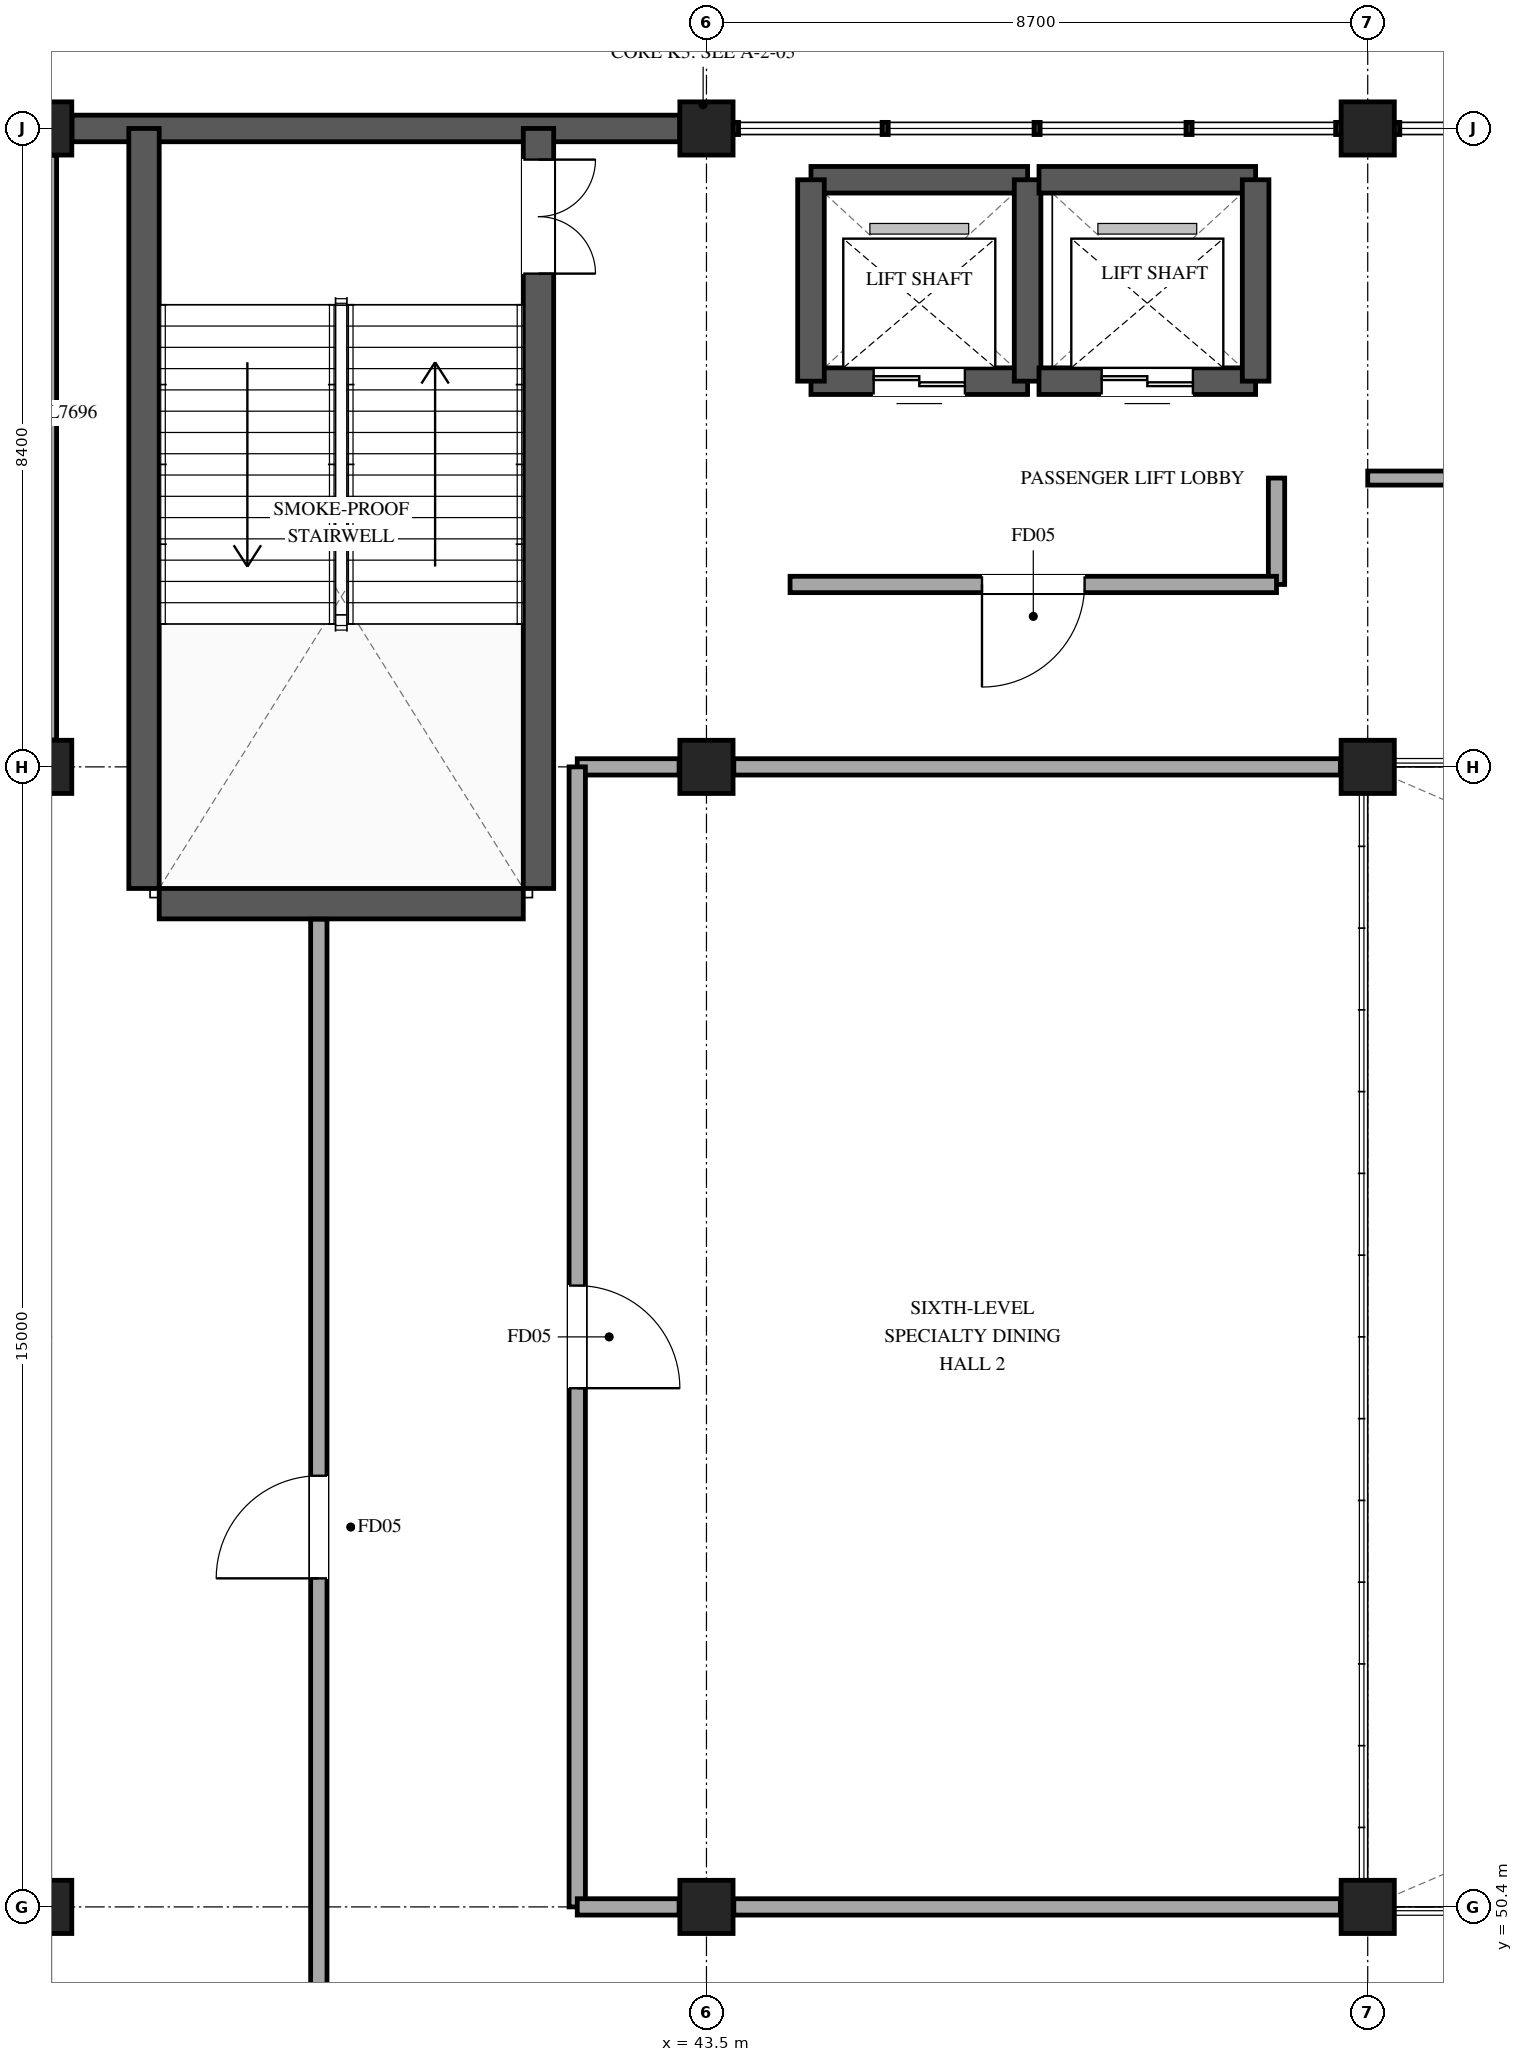
"""IFC4 building model, lengths in metres.
Left out: names, types, materials, properties, quantities, classifications, styles, units other than length and angle.
Written with IfcOpenShell. Run it as: python <this file> out.ifc"""

import sys

from ifc_helpers import new_model, si_unit, direction, frame, frame_2d, origin, origin_2d, place, context, subcontext, project, spatial, rectangle, extrude, element, fill, save


model = new_model("IFC4")
c1 = context("Model", 3, precision=1e-05, world=origin(), true_north=direction((0.0, 1.0)))
c2 = subcontext(c1, "Body", "Model", "MODEL_VIEW")
j1 = project(units=[si_unit("LENGTHUNIT", "METRE"), si_unit("PLANEANGLEUNIT", "RADIAN")], contexts=[c1])
p1 = place(None, origin())
s1 = spatial("IfcSite", under=j1, at=p1, CompositionType="ELEMENT")
p2 = place(p1, origin())
s2 = spatial("IfcBuilding", under=s1, at=p2, CompositionType="ELEMENT")
p3 = place(p2, frame((0.0, 0.0, 26.7)))
s3 = spatial("IfcBuildingStorey", under=s2, at=p3, CompositionType="ELEMENT", Elevation=26.7)
for number, where, z_axis, x_axis in (
    (1, (34.8, 50.4, 0.0), (0.0, 0.0, 1.0), (1.0, 0.0, 0.0)),
    (2, (34.8, 65.4, 0.0), (0.0, 0.0, 1.0), (1.0, 0.0, 0.0)),
    (3, (34.8, 73.8, 0.0), (0.0, 0.0, 1.0), (1.0, 0.0, 0.0)),
    (4, (43.5, 50.4, 0.0), (0.0, 0.0, 1.0), (1.0, 0.0, 0.0)),
    (5, (43.5, 65.4, 0.0), (0.0, 0.0, 1.0), (1.0, 0.0, 0.0)),
    (6, (43.5, 73.8, 0.0), (0.0, 0.0, 1.0), (1.0, 0.0, 0.0)),
    (7, (52.2, 50.4, 0.0), (0.0, 0.0, 1.0), (1.0, 0.0, 0.0)),
    (8, (52.2, 65.4, 0.0), (0.0, 0.0, 1.0), (1.0, 0.0, 0.0)),
    (9, (52.2, 73.8, 0.0), (0.0, 0.0, 1.0), (1.0, 0.0, 0.0)),
):
    element("IfcColumn", number, at=place(p3, frame(where, z_axis=z_axis, x_axis=x_axis)), inside=s3, PredefinedType="COLUMN", context=c2, shape_type="SweptSolid", body=[
        extrude(rectangle(XDim=0.7, YDim=0.7, at=origin_2d()), origin(), (0.0, 0.0, 1.0), 4.8),
    ])
p4 = place(p3, frame((34.8, 65.752, 0.0), z_axis=(0.0, 0.0, 1.0), x_axis=(0.0, 1.0, 0.0)))
e10 = element("IfcWall", 10, at=p4, inside=s3, PredefinedType="STANDARD", context=c2, shape_type="SweptSolid", body=[
    extrude(rectangle(XDim=7.696, YDim=0.3, at=frame_2d((3.848, 0.0))), origin(), (0.0, 0.0, 1.0), 3.955),
])
p5 = place(p3, frame((35.152, 73.8, 0.0), z_axis=(0.0, 0.0, 1.0), x_axis=(1.0, 0.0, 0.0)))
e11 = element("IfcWall", 11, at=p5, inside=s3, PredefinedType="STANDARD", context=c2, shape_type="SweptSolid", body=[
    extrude(rectangle(XDim=7.996, YDim=0.35, at=frame_2d((3.998, 0.0))), origin(), (0.0, 0.0, 1.0), 4.49),
])
p6 = place(p3, frame((36.1, 63.8, 0.0), z_axis=(0.0, 0.0, 1.0), x_axis=(0.0, 1.0, 0.0)))
e12 = element("IfcWall", 12, at=p6, inside=s3, PredefinedType="SHEAR", context=c2, shape_type="SweptSolid", body=[
    extrude(rectangle(XDim=10.0, YDim=0.4, at=frame_2d((5.0, 0.0))), origin(), (0.0, 0.0, 1.0), 4.8),
])
p7 = place(p3, frame((41.29, 73.8, 0.0), z_axis=(0.0, 0.0, 1.0), x_axis=(0.0, -1.0, 0.0)))
e13 = element("IfcWall", 13, at=p7, inside=s3, PredefinedType="SHEAR", context=c2, shape_type="SweptSolid", body=[
    extrude(rectangle(XDim=10.0, YDim=0.4, at=frame_2d((5.0, 0.0))), origin(), (0.0, 0.0, 1.0), 4.8),
])
p8 = place(p7, frame((0.41, 0.0, 0.0)))
e14 = element("IfcOpeningElement", 14, at=p8, cuts=e13, PredefinedType="OPENING", context=c2, shape_type="SweptSolid", body=[
    extrude(rectangle(XDim=1.5, YDim=2.2, at=frame_2d((0.75, 1.1))), frame((0.0, 0.21, 0.0), z_axis=(0.0, -1.0, 0.0), x_axis=(1.0, 0.0, 0.0)), (0.0, 0.0, 1.0), 0.42),
])
p9 = place(p3, frame((41.09, 63.6, 0.0), z_axis=(0.0, 0.0, 1.0), x_axis=(-1.0, 0.0, 0.0)))
e15 = element("IfcWall", 15, at=p9, inside=s3, PredefinedType="SHEAR", context=c2, shape_type="SweptSolid", body=[
    extrude(rectangle(XDim=4.79, YDim=0.4, at=frame_2d((2.395, 0.0))), origin(), (0.0, 0.0, 1.0), 4.8),
])
p10 = place(p3, frame((44.875, 73.125, 0.0), z_axis=(0.0, 0.0, 1.0), x_axis=(1.0, 0.0, 0.0)))
e16 = element("IfcWall", 16, at=p10, inside=s3, PredefinedType="SHEAR", context=c2, shape_type="SweptSolid", body=[
    extrude(rectangle(XDim=2.85, YDim=0.35, at=frame_2d((1.425, 0.0))), origin(), (0.0, 0.0, 1.0), 4.8),
])
p11 = place(p3, frame((47.725, 70.475, 0.0), z_axis=(0.0, 0.0, 1.0), x_axis=(-1.0, 0.0, 0.0)))
e17 = element("IfcWall", 17, at=p11, inside=s3, PredefinedType="SHEAR", context=c2, shape_type="SweptSolid", body=[
    extrude(rectangle(XDim=2.85, YDim=0.35, at=frame_2d((1.425, 0.0))), origin(), (0.0, 0.0, 1.0), 4.8),
])
p12 = place(p11, frame((0.825, 0.0, 0.0)))
e18 = element("IfcOpeningElement", 18, at=p12, cuts=e17, PredefinedType="OPENING", context=c2, shape_type="SweptSolid", body=[
    extrude(rectangle(XDim=1.2, YDim=2.2, at=frame_2d((0.6, 1.1))), frame((0.0, 0.185, 0.0), z_axis=(0.0, -1.0, 0.0), x_axis=(1.0, 0.0, 0.0)), (0.0, 0.0, 1.0), 0.37),
])
for number, where, z_axis, x_axis in (
    (19, (44.875, 70.475, 0.0), (0.0, 0.0, 1.0), (0.0, 1.0, 0.0)),
    (20, (47.725, 73.125, 0.0), (0.0, 0.0, 1.0), (0.0, -1.0, 0.0)),
):
    element("IfcWall", number, at=place(p3, frame(where, z_axis=z_axis, x_axis=x_axis)), inside=s3, PredefinedType="SHEAR", context=c2, shape_type="SweptSolid", body=[
        extrude(rectangle(XDim=2.65, YDim=0.35, at=frame_2d((1.325, 0.0))), origin(), (0.0, 0.0, 1.0), 4.8),
    ])
p13 = place(p3, frame((47.875, 73.125, 0.0), z_axis=(0.0, 0.0, 1.0), x_axis=(1.0, 0.0, 0.0)))
e21 = element("IfcWall", 21, at=p13, inside=s3, PredefinedType="SHEAR", context=c2, shape_type="SweptSolid", body=[
    extrude(rectangle(XDim=2.85, YDim=0.35, at=frame_2d((1.425, 0.0))), origin(), (0.0, 0.0, 1.0), 4.8),
])
p14 = place(p3, frame((50.725, 70.475, 0.0), z_axis=(0.0, 0.0, 1.0), x_axis=(-1.0, 0.0, 0.0)))
e22 = element("IfcWall", 22, at=p14, inside=s3, PredefinedType="SHEAR", context=c2, shape_type="SweptSolid", body=[
    extrude(rectangle(XDim=2.85, YDim=0.35, at=frame_2d((1.425, 0.0))), origin(), (0.0, 0.0, 1.0), 4.8),
])
p15 = place(p14, frame((0.825, 0.0, 0.0)))
e23 = element("IfcOpeningElement", 23, at=p15, cuts=e22, PredefinedType="OPENING", context=c2, shape_type="SweptSolid", body=[
    extrude(rectangle(XDim=1.2, YDim=2.2, at=frame_2d((0.6, 1.1))), frame((0.0, 0.185, 0.0), z_axis=(0.0, -1.0, 0.0), x_axis=(1.0, 0.0, 0.0)), (0.0, 0.0, 1.0), 0.37),
])
p16 = place(p3, frame((50.725, 73.125, 0.0), z_axis=(0.0, 0.0, 1.0), x_axis=(0.0, -1.0, 0.0)))
e24 = element("IfcWall", 24, at=p16, inside=s3, PredefinedType="SHEAR", context=c2, shape_type="SweptSolid", body=[
    extrude(rectangle(XDim=2.65, YDim=0.35, at=frame_2d((1.325, 0.0))), origin(), (0.0, 0.0, 1.0), 4.8),
])
p17 = place(p3, frame((51.0, 69.2, 0.0), z_axis=(0.0, 0.0, 1.0), x_axis=(0.0, -1.0, 0.0)))
e25 = element("IfcWall", 25, at=p17, inside=s3, PredefinedType="PARTITIONING", context=c2, shape_type="SweptSolid", body=[
    extrude(rectangle(XDim=1.4, YDim=0.215, at=frame_2d((0.7, 0.0))), origin(), (0.0, 0.0, 1.0), 4.46),
])
p18 = place(p3, frame((51.0, 67.8, 0.0), z_axis=(0.0, 0.0, 1.0), x_axis=(-1.0, 0.0, 0.0)))
e26 = element("IfcWall", 26, at=p18, inside=s3, PredefinedType="PARTITIONING", context=c2, shape_type="SweptSolid", body=[
    extrude(rectangle(XDim=6.4, YDim=0.215, at=frame_2d((3.2, 0.0))), origin(), (0.0, 0.0, 1.0), 4.46),
])
p19 = place(p18, frame((2.525, 0.0, 0.0)))
e27 = element("IfcOpeningElement", 27, at=p19, cuts=e26, PredefinedType="OPENING", context=c2, shape_type="SweptSolid", body=[
    extrude(rectangle(XDim=1.35, YDim=2.2, at=frame_2d((0.675, 1.1))), frame((0.0, 0.118, 0.0), z_axis=(0.0, -1.0, 0.0), x_axis=(1.0, 0.0, 0.0)), (0.0, 0.0, 1.0), 0.235),
])
p20 = place(p3, frame((38.4, 47.4, 0.0), z_axis=(0.0, 0.0, 1.0), x_axis=(0.0, 1.0, 0.0)))
e28 = element("IfcWall", 28, at=p20, inside=s3, PredefinedType="PARTITIONING", context=c2, shape_type="SweptSolid", body=[
    extrude(rectangle(XDim=15.995, YDim=0.215, at=frame_2d((7.998, 0.0))), origin(), (0.0, 0.0, 1.0), 3.76),
])
p21 = place(p20, frame((7.323, 0.0, 0.0)))
e29 = element("IfcOpeningElement", 29, at=p21, cuts=e28, PredefinedType="OPENING", context=c2, shape_type="SweptSolid", body=[
    extrude(rectangle(XDim=1.35, YDim=2.2, at=frame_2d((0.675, 1.1))), frame((0.0, 0.118, 0.0), z_axis=(0.0, -1.0, 0.0), x_axis=(1.0, 0.0, 0.0)), (0.0, 0.0, 1.0), 0.235),
])
p22 = place(p3, frame((51.84, 65.4, 0.0), z_axis=(0.0, 0.0, 1.0), x_axis=(-1.0, 0.0, 0.0)))
e30 = element("IfcWall", 30, at=p22, inside=s3, PredefinedType="PARTITIONING", context=c2, shape_type="SweptSolid", body=[
    extrude(rectangle(XDim=7.98, YDim=0.215, at=frame_2d((3.99, 0.0))), origin(), (0.0, 0.0, 1.0), 3.76),
])
p23 = place(p3, frame((43.14, 65.4, 0.0), z_axis=(0.0, 0.0, 1.0), x_axis=(-1.0, 0.0, 0.0)))
e31 = element("IfcWall", 31, at=p23, inside=s3, PredefinedType="PARTITIONING", context=c2, shape_type="SweptSolid", body=[
    extrude(rectangle(XDim=1.34, YDim=0.215, at=frame_2d((0.67, 0.0))), origin(), (0.0, 0.0, 1.0), 4.46),
])
p24 = place(p3, frame((41.8, 65.4, 0.0), z_axis=(0.0, 0.0, 1.0), x_axis=(0.0, -1.0, 0.0)))
e32 = element("IfcWall", 32, at=p24, inside=s3, PredefinedType="PARTITIONING", context=c2, shape_type="SweptSolid", body=[
    extrude(rectangle(XDim=15.0, YDim=0.215, at=frame_2d((7.5, 0.0))), origin(), (0.0, 0.0, 1.0), 3.76),
])
p25 = place(p24, frame((6.825, 0.0, 0.0)))
e33 = element("IfcOpeningElement", 33, at=p25, cuts=e32, PredefinedType="OPENING", context=c2, shape_type="SweptSolid", body=[
    extrude(rectangle(XDim=1.35, YDim=2.2, at=frame_2d((0.675, 1.1))), frame((0.0, 0.118, 0.0), z_axis=(0.0, -1.0, 0.0), x_axis=(1.0, 0.0, 0.0)), (0.0, 0.0, 1.0), 0.235),
])
p26 = place(p3, frame((41.8, 50.4, 0.0), z_axis=(0.0, 0.0, 1.0), x_axis=(1.0, 0.0, 0.0)))
e34 = element("IfcWall", 34, at=p26, inside=s3, PredefinedType="PARTITIONING", context=c2, shape_type="SweptSolid", body=[
    extrude(rectangle(XDim=1.34, YDim=0.215, at=frame_2d((0.67, 0.0))), origin(), (0.0, 0.0, 1.0), 3.76),
])
p27 = place(p3, frame((43.86, 50.4, 0.0), z_axis=(0.0, 0.0, 1.0), x_axis=(1.0, 0.0, 0.0)))
e35 = element("IfcWall", 35, at=p27, inside=s3, PredefinedType="PARTITIONING", context=c2, shape_type="SweptSolid", body=[
    extrude(rectangle(XDim=7.98, YDim=0.215, at=frame_2d((3.99, 0.0))), origin(), (0.0, 0.0, 1.0), 3.76),
])
p28 = place(p3, frame((52.2, 69.2, 0.0), z_axis=(0.0, 0.0, 1.0), x_axis=(1.0, 0.0, 0.0)))
e36 = element("IfcWall", 36, at=p28, inside=s3, PredefinedType="PARTITIONING", context=c2, shape_type="SweptSolid", body=[
    extrude(rectangle(XDim=29.8, YDim=0.185, at=frame_2d((14.9, 0.0))), origin(), (0.0, 0.0, 1.0), 3.76),
])
p29 = place(p28, frame((14.225, 0.0, 0.0)))
e37 = element("IfcOpeningElement", 37, at=p29, cuts=e36, PredefinedType="OPENING", context=c2, shape_type="SweptSolid", body=[
    extrude(rectangle(XDim=1.35, YDim=2.2, at=frame_2d((0.675, 1.1))), frame((0.0, 0.103, 0.0), z_axis=(0.0, -1.0, 0.0), x_axis=(1.0, 0.0, 0.0)), (0.0, 0.0, 1.0), 0.205),
])
p30 = place(p8, origin())
e38 = element("IfcDoor", 38, at=p30, inside=s3, OperationType="DOUBLE_DOOR_SINGLE_SWING", PredefinedType="DOOR", context=c2, shape_type="SweptSolid", body=[
    extrude(rectangle(XDim=1.5, YDim=2.2, at=frame_2d((0.75, 1.1))), frame((0.0, 0.025, 0.0), z_axis=(0.0, -1.0, 0.0), x_axis=(1.0, 0.0, 0.0)), (0.0, 0.0, 1.0), 0.05),
])
fill(e14, e38)
p31 = place(p12, origin())
e39 = element("IfcDoor", 39, at=p31, inside=s3, OperationType="DOUBLE_DOOR_SLIDING", PredefinedType="DOOR", context=c2, shape_type="SweptSolid", body=[
    extrude(rectangle(XDim=1.2, YDim=2.2, at=frame_2d((0.6, 1.1))), frame((0.0, 0.025, 0.0), z_axis=(0.0, -1.0, 0.0), x_axis=(1.0, 0.0, 0.0)), (0.0, 0.0, 1.0), 0.05),
])
fill(e18, e39)
p32 = place(p15, origin())
e40 = element("IfcDoor", 40, at=p32, inside=s3, OperationType="DOUBLE_DOOR_SLIDING", PredefinedType="DOOR", context=c2, shape_type="SweptSolid", body=[
    extrude(rectangle(XDim=1.2, YDim=2.2, at=frame_2d((0.6, 1.1))), frame((0.0, 0.025, 0.0), z_axis=(0.0, -1.0, 0.0), x_axis=(1.0, 0.0, 0.0)), (0.0, 0.0, 1.0), 0.05),
])
fill(e23, e40)
p33 = place(p19, origin())
e41 = element("IfcDoor", 41, at=p33, inside=s3, OperationType="SINGLE_SWING_RIGHT", PredefinedType="DOOR", context=c2, shape_type="SweptSolid", body=[
    extrude(rectangle(XDim=1.35, YDim=2.2, at=frame_2d((0.675, 1.1))), frame((0.0, 0.025, 0.0), z_axis=(0.0, -1.0, 0.0), x_axis=(1.0, 0.0, 0.0)), (0.0, 0.0, 1.0), 0.05),
])
fill(e27, e41)
p34 = place(p21, origin())
e42 = element("IfcDoor", 42, at=p34, inside=s3, OperationType="SINGLE_SWING_LEFT", PredefinedType="DOOR", context=c2, shape_type="SweptSolid", body=[
    extrude(rectangle(XDim=1.35, YDim=2.2, at=frame_2d((0.675, 1.1))), frame((0.0, 0.025, 0.0), z_axis=(0.0, -1.0, 0.0), x_axis=(1.0, 0.0, 0.0)), (0.0, 0.0, 1.0), 0.05),
])
fill(e29, e42)
p35 = place(p25, origin())
e43 = element("IfcDoor", 43, at=p35, inside=s3, OperationType="SINGLE_SWING_RIGHT", PredefinedType="DOOR", context=c2, shape_type="SweptSolid", body=[
    extrude(rectangle(XDim=1.35, YDim=2.2, at=frame_2d((0.675, 1.1))), frame((0.0, 0.025, 0.0), z_axis=(0.0, -1.0, 0.0), x_axis=(1.0, 0.0, 0.0)), (0.0, 0.0, 1.0), 0.05),
])
fill(e33, e43)
save(model, sys.argv[1])
